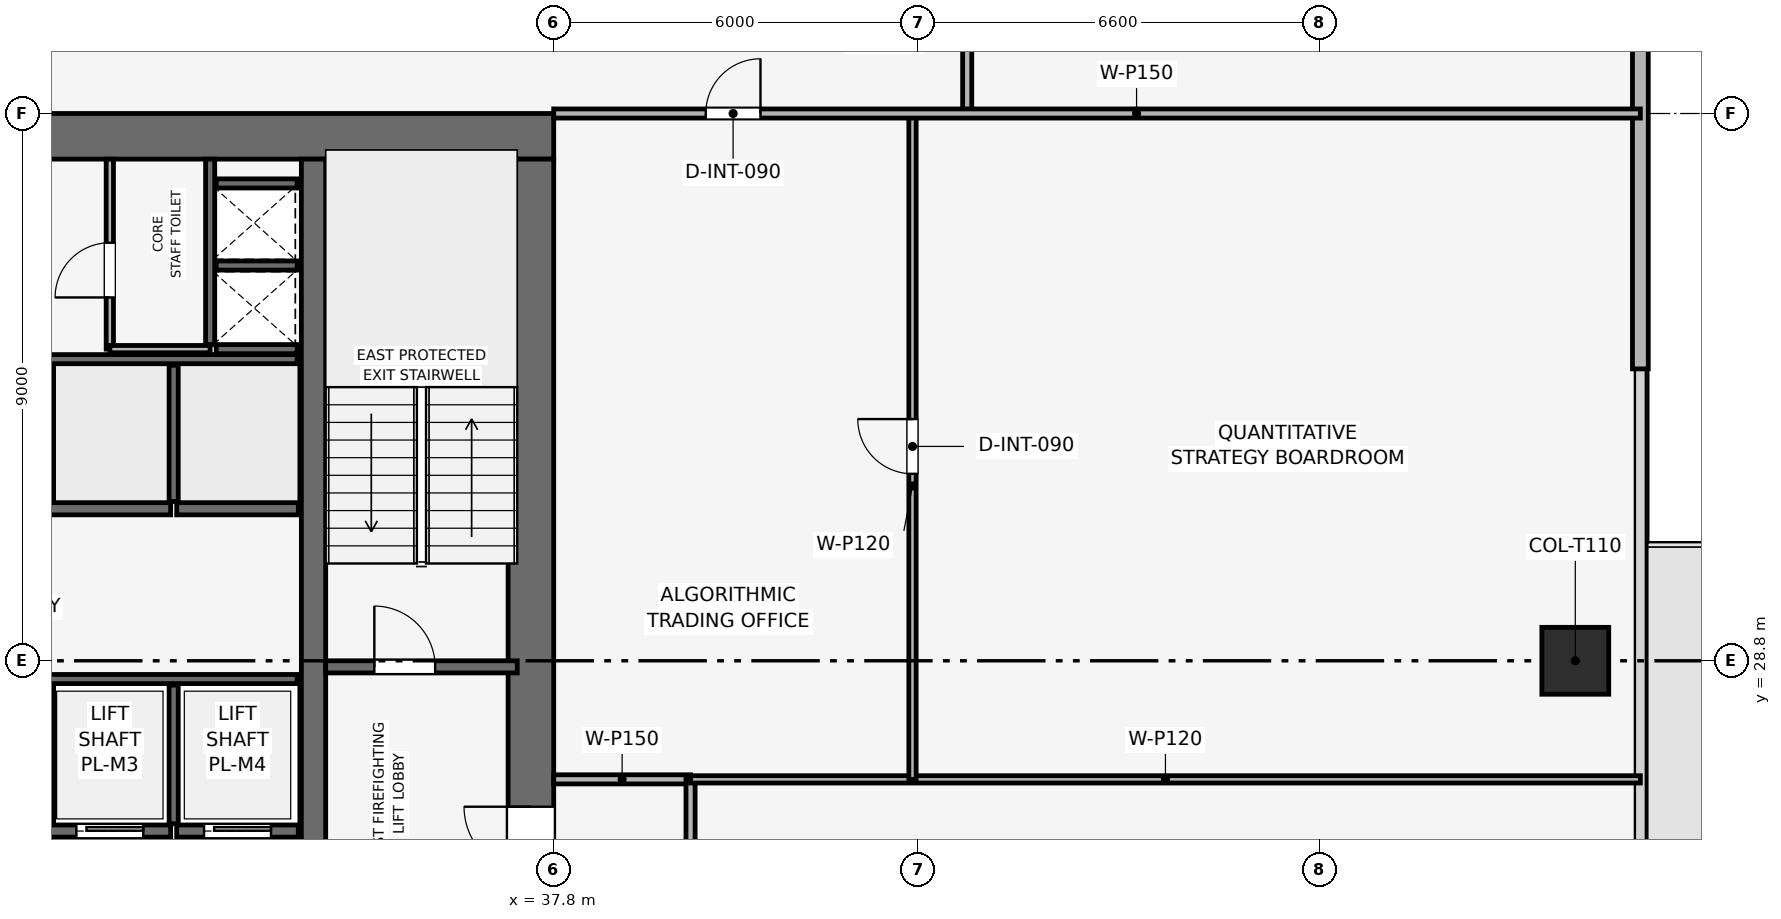
"""IFC4 building model, lengths in metres.
Left out: names, types, materials, properties, quantities, classifications, styles, units other than length and angle.
Written with IfcOpenShell. Run it as: python <this file> out.ifc"""

import sys

from ifc_helpers import new_model, si_unit, direction, frame, frame_2d, origin, origin_2d, place, context, subcontext, project, spatial, rectangle, extrude, element, fill, save


model = new_model("IFC4")
c1 = context("Model", 3, precision=1e-05, world=origin(), true_north=direction((0.0, 1.0)))
c2 = subcontext(c1, "Body", "Model", "MODEL_VIEW")
j1 = project(units=[si_unit("LENGTHUNIT", "METRE"), si_unit("PLANEANGLEUNIT", "RADIAN")], contexts=[c1])
p1 = place(None, origin())
s1 = spatial("IfcSite", under=j1, at=p1, CompositionType="ELEMENT")
p2 = place(p1, origin())
s2 = spatial("IfcBuilding", under=s1, at=p2, CompositionType="ELEMENT")
p3 = place(p2, frame((0.0, 0.0, 229.95)))
s3 = spatial("IfcBuildingStorey", under=s2, at=p3, CompositionType="ELEMENT", Elevation=229.95)
p4 = place(p3, frame((19.8, 37.425, 0.0), z_axis=(0.0, 0.0, 1.0), x_axis=(1.0, 0.0, 0.0)))
e1 = element("IfcWall", 1, at=p4, inside=s3, PredefinedType="SHEAR", context=c2, shape_type="SweptSolid", body=[
    extrude(rectangle(XDim=18.0, YDim=0.75, at=frame_2d((9.0, 0.0))), origin(), (0.0, 0.0, 1.0), 3.75),
])
p5 = place(p4, frame((7.05, 0.0, 0.0)))
e2 = element("IfcOpeningElement", 2, at=p5, cuts=e1, PredefinedType="OPENING", context=c2, shape_type="SweptSolid", body=[
    extrude(rectangle(XDim=1.1, YDim=2.15, at=frame_2d((0.55, 1.075))), frame((0.0, 0.385, 0.0), z_axis=(0.0, -1.0, 0.0), x_axis=(1.0, 0.0, 0.0)), (0.0, 0.0, 1.0), 0.77),
])
p6 = place(p3, frame((37.425, 20.55, 0.0), z_axis=(0.0, 0.0, 1.0), x_axis=(0.0, 1.0, 0.0)))
e3 = element("IfcWall", 3, at=p6, inside=s3, PredefinedType="SHEAR", context=c2, shape_type="SweptSolid", body=[
    extrude(rectangle(XDim=16.5, YDim=0.75, at=frame_2d((8.25, 0.0))), origin(), (0.0, 0.0, 1.0), 3.75),
])
p7 = place(p6, frame((4.75, 0.0, 0.0)))
e4 = element("IfcOpeningElement", 4, at=p7, cuts=e3, PredefinedType="OPENING", context=c2, shape_type="SweptSolid", body=[
    extrude(rectangle(XDim=1.1, YDim=2.15, at=frame_2d((0.55, 1.075))), frame((0.0, 0.385, 0.0), z_axis=(0.0, -1.0, 0.0), x_axis=(1.0, 0.0, 0.0)), (0.0, 0.0, 1.0), 0.77),
])
p8 = place(p3, frame((33.85, 20.55, 0.0), z_axis=(0.0, 0.0, 1.0), x_axis=(0.0, 1.0, 0.0)))
e5 = element("IfcWall", 5, at=p8, inside=s3, PredefinedType="SHEAR", context=c2, shape_type="SweptSolid", body=[
    extrude(rectangle(XDim=16.5, YDim=0.4, at=frame_2d((8.25, 0.0))), origin(), (0.0, 0.0, 1.0), 3.75),
])
p9 = place(p3, frame((54.6, 28.8, 0.003), z_axis=(0.0, 0.0, 1.0), x_axis=(1.0, 0.0, 0.0)))
e6 = element("IfcColumn", 6, at=p9, inside=s3, PredefinedType="COLUMN", context=c2, shape_type="SweptSolid", body=[
    extrude(rectangle(XDim=1.1, YDim=1.1, at=origin_2d()), origin(), (0.0, 0.0, 1.0), 3.494),
])
p10 = place(p3, frame((55.67, 48.3, 0.0), z_axis=(0.0, 0.0, 1.0), x_axis=(0.0, -1.0, 0.0)))
e7 = element("IfcWall", 7, at=p10, inside=s3, PredefinedType="SOLIDWALL", context=c2, shape_type="SweptSolid", body=[
    extrude(rectangle(XDim=14.7, YDim=0.26, at=frame_2d((7.35, 0.0))), origin(), (0.0, 0.0, 1.0), 3.5),
])
p11 = place(p10, frame((0.25, 0.0, 0.9)))
e8 = element("IfcOpeningElement", 8, at=p11, cuts=e7, PredefinedType="OPENING", context=c2, shape_type="SweptSolid", body=[
    extrude(rectangle(XDim=3.8, YDim=1.9, at=frame_2d((1.9, 0.95))), frame((0.0, 0.14, 0.0), z_axis=(0.0, -1.0, 0.0), x_axis=(1.0, 0.0, 0.0)), (0.0, 0.0, 1.0), 0.28),
])
p12 = place(p3, frame((34.05, 28.7, 0.0), z_axis=(0.0, 0.0, 1.0), x_axis=(1.0, 0.0, 0.0)))
e9 = element("IfcWall", 9, at=p12, inside=s3, PredefinedType="SHEAR", context=c2, shape_type="SweptSolid", body=[
    extrude(rectangle(XDim=3.15, YDim=0.2, at=frame_2d((1.575, 0.0))), origin(), (0.0, 0.0, 1.0), 3.5),
])
p13 = place(p12, frame((0.8, 0.0, 0.0)))
e10 = element("IfcOpeningElement", 10, at=p13, cuts=e9, PredefinedType="OPENING", context=c2, shape_type="SweptSolid", body=[
    extrude(rectangle(XDim=1.0, YDim=2.1, at=frame_2d((0.5, 1.05))), frame((0.0, 0.11, 0.0), z_axis=(0.0, -1.0, 0.0), x_axis=(1.0, 0.0, 0.0)), (0.0, 0.0, 1.0), 0.22),
])
p14 = place(p3, frame((32.15, 34.0, 0.0), z_axis=(0.0, 0.0, 1.0), x_axis=(0.0, 1.0, 0.0)))
e11 = element("IfcWall", 11, at=p14, inside=s3, PredefinedType="SHEAR", context=c2, shape_type="SweptSolid", body=[
    extrude(rectangle(XDim=3.05, YDim=0.15, at=frame_2d((1.525, 0.0))), origin(), (0.0, 0.0, 1.0), 3.5),
])
for number, where, z_axis, x_axis in (
    (12, (32.25, 33.925, 0.0), (0.0, 0.0, 1.0), (1.0, 0.0, 0.0)),
    (13, (32.25, 35.3, 0.0), (0.0, 0.0, 1.0), (1.0, 0.0, 0.0)),
):
    element("IfcWall", number, at=place(p3, frame(where, z_axis=z_axis, x_axis=x_axis)), inside=s3, PredefinedType="SHEAR", context=c2, shape_type="SweptSolid", body=[
        extrude(rectangle(XDim=1.33, YDim=0.15, at=frame_2d((0.665, 0.0))), origin(), (0.0, 0.0, 1.0), 3.5),
    ])
p15 = place(p3, frame((29.5, 26.0, 0.0), z_axis=(0.0, 0.0, 1.0), x_axis=(1.0, 0.0, 0.0)))
e14 = element("IfcWall", 14, at=p15, inside=s3, PredefinedType="SHEAR", context=c2, shape_type="SweptSolid", body=[
    extrude(rectangle(XDim=2.0, YDim=0.2, at=frame_2d((1.0, 0.0))), origin(), (0.0, 0.0, 1.0), 3.5),
])
p16 = place(p15, frame((0.45, 0.0, 0.0)))
e15 = element("IfcOpeningElement", 15, at=p16, cuts=e14, PredefinedType="OPENING", context=c2, shape_type="SweptSolid", body=[
    extrude(rectangle(XDim=1.1, YDim=2.15, at=frame_2d((0.55, 1.075))), frame((0.0, 0.11, 0.0), z_axis=(0.0, -1.0, 0.0), x_axis=(1.0, 0.0, 0.0)), (0.0, 0.0, 1.0), 0.22),
])
p17 = place(p3, frame((31.6, 26.0, 0.0), z_axis=(0.0, 0.0, 1.0), x_axis=(1.0, 0.0, 0.0)))
e16 = element("IfcWall", 16, at=p17, inside=s3, PredefinedType="SHEAR", context=c2, shape_type="SweptSolid", body=[
    extrude(rectangle(XDim=2.0, YDim=0.2, at=frame_2d((1.0, 0.0))), origin(), (0.0, 0.0, 1.0), 3.5),
])
p18 = place(p17, frame((0.45, 0.0, 0.0)))
e17 = element("IfcOpeningElement", 17, at=p18, cuts=e16, PredefinedType="OPENING", context=c2, shape_type="SweptSolid", body=[
    extrude(rectangle(XDim=1.1, YDim=2.15, at=frame_2d((0.55, 1.075))), frame((0.0, 0.11, 0.0), z_axis=(0.0, -1.0, 0.0), x_axis=(1.0, 0.0, 0.0)), (0.0, 0.0, 1.0), 0.22),
])
for number, where, z_axis, x_axis in (
    (18, (29.5, 31.3, 0.0), (0.0, 0.0, 1.0), (1.0, 0.0, 0.0)),
    (19, (31.6, 31.3, 0.0), (0.0, 0.0, 1.0), (1.0, 0.0, 0.0)),
):
    element("IfcWall", number, at=place(p3, frame(where, z_axis=z_axis, x_axis=x_axis)), inside=s3, PredefinedType="SHEAR", context=c2, shape_type="SweptSolid", body=[
        extrude(rectangle(XDim=2.0, YDim=0.2, at=frame_2d((1.0, 0.0))), origin(), (0.0, 0.0, 1.0), 3.5),
    ])
p19 = place(p3, frame((32.25, 36.65, 0.0), z_axis=(0.0, 0.0, 1.0), x_axis=(1.0, 0.0, 0.0)))
e20 = element("IfcWall", 20, at=p19, inside=s3, PredefinedType="SHEAR", context=c2, shape_type="SweptSolid", body=[
    extrude(rectangle(XDim=1.33, YDim=0.15, at=frame_2d((0.665, 0.0))), origin(), (0.0, 0.0, 1.0), 3.5),
])
p20 = place(p3, frame((29.5, 28.5, 0.0), z_axis=(0.0, 0.0, 1.0), x_axis=(1.0, 0.0, 0.0)))
e21 = element("IfcWall", 21, at=p20, inside=s3, PredefinedType="SHEAR", context=c2, shape_type="SweptSolid", body=[
    extrude(rectangle(XDim=4.08, YDim=0.15, at=frame_2d((2.04, 0.0))), origin(), (0.0, 0.0, 1.0), 3.5),
])
for number, where, z_axis, x_axis in (
    (22, (29.5, 26.12, 0.0), (0.0, 0.0, 1.0), (0.0, 1.0, 0.0)),
    (23, (31.55, 26.12, 0.0), (0.0, 0.0, 1.0), (0.0, 1.0, 0.0)),
):
    element("IfcWall", number, at=place(p3, frame(where, z_axis=z_axis, x_axis=x_axis)), inside=s3, PredefinedType="SHEAR", context=c2, shape_type="SweptSolid", body=[
        extrude(rectangle(XDim=2.28, YDim=0.15, at=frame_2d((1.14, 0.0))), origin(), (0.0, 0.0, 1.0), 3.5),
    ])
p21 = place(p3, frame((29.5, 33.76, 0.0), z_axis=(0.0, 0.0, 1.0), x_axis=(1.0, 0.0, 0.0)))
e24 = element("IfcWall", 24, at=p21, inside=s3, PredefinedType="SHEAR", context=c2, shape_type="SweptSolid", body=[
    extrude(rectangle(XDim=4.08, YDim=0.15, at=frame_2d((2.04, 0.0))), origin(), (0.0, 0.0, 1.0), 3.5),
])
for number, where, z_axis, x_axis in (
    (25, (29.5, 31.42, 0.0), (0.0, 0.0, 1.0), (0.0, 1.0, 0.0)),
    (26, (31.55, 31.42, 0.0), (0.0, 0.0, 1.0), (0.0, 1.0, 0.0)),
):
    element("IfcWall", number, at=place(p3, frame(where, z_axis=z_axis, x_axis=x_axis)), inside=s3, PredefinedType="SHEAR", context=c2, shape_type="SweptSolid", body=[
        extrude(rectangle(XDim=2.24, YDim=0.15, at=frame_2d((1.12, 0.0))), origin(), (0.0, 0.0, 1.0), 3.5),
    ])
p22 = place(p3, frame((30.5, 33.925, 0.0), z_axis=(0.0, 0.0, 1.0), x_axis=(0.0, 1.0, 0.0)))
e27 = element("IfcWall", 27, at=p22, inside=s3, PredefinedType="PARTITIONING", context=c2, shape_type="SweptSolid", body=[
    extrude(rectangle(XDim=3.125, YDim=0.12, at=frame_2d((1.562, 0.0))), origin(), (0.0, 0.0, 1.0), 3.5),
])
p23 = place(p22, frame((0.85, 0.0, 0.0)))
e28 = element("IfcOpeningElement", 28, at=p23, cuts=e27, PredefinedType="OPENING", context=c2, shape_type="SweptSolid", body=[
    extrude(rectangle(XDim=0.9, YDim=2.1, at=frame_2d((0.45, 1.05))), frame((0.0, 0.07, 0.0), z_axis=(0.0, -1.0, 0.0), x_axis=(1.0, 0.0, 0.0)), (0.0, 0.0, 1.0), 0.14),
])
p24 = place(p3, frame((30.5, 33.925, 0.0), z_axis=(0.0, 0.0, 1.0), x_axis=(1.0, 0.0, 0.0)))
e29 = element("IfcWall", 29, at=p24, inside=s3, PredefinedType="PARTITIONING", context=c2, shape_type="SweptSolid", body=[
    extrude(rectangle(XDim=1.65, YDim=0.12, at=frame_2d((0.825, 0.0))), origin(), (0.0, 0.0, 1.0), 3.5),
])
p25 = place(p3, frame((37.8, 26.85, 0.0), z_axis=(0.0, 0.0, 1.0), x_axis=(1.0, 0.0, 0.0)))
e30 = element("IfcWall", 30, at=p25, inside=s3, PredefinedType="PARTITIONING", context=c2, shape_type="SweptSolid", body=[
    extrude(rectangle(XDim=2.25, YDim=0.15, at=frame_2d((1.125, 0.0))), origin(), (0.0, 0.0, 1.0), 3.5),
])
p26 = place(p3, frame((40.05, 19.8, 0.0), z_axis=(0.0, 0.0, 1.0), x_axis=(0.0, 1.0, 0.0)))
e31 = element("IfcWall", 31, at=p26, inside=s3, PredefinedType="PARTITIONING", context=c2, shape_type="SweptSolid", body=[
    extrude(rectangle(XDim=7.05, YDim=0.15, at=frame_2d((3.525, 0.0))), origin(), (0.0, 0.0, 1.0), 3.035),
])
p27 = place(p3, frame((40.05, 26.85, 0.0), z_axis=(0.0, 0.0, 1.0), x_axis=(1.0, 0.0, 0.0)))
e32 = element("IfcWall", 32, at=p27, inside=s3, PredefinedType="PARTITIONING", context=c2, shape_type="SweptSolid", body=[
    extrude(rectangle(XDim=15.62, YDim=0.12, at=frame_2d((7.81, 0.0))), origin(), (0.0, 0.0, 1.0), 2.885),
])
p28 = place(p3, frame((43.7, 26.85, 0.0), z_axis=(0.0, 0.0, 1.0), x_axis=(0.0, 1.0, 0.0)))
e33 = element("IfcWall", 33, at=p28, inside=s3, PredefinedType="PARTITIONING", context=c2, shape_type="SweptSolid", body=[
    extrude(rectangle(XDim=10.95, YDim=0.12, at=frame_2d((5.475, 0.0))), origin(), (0.0, 0.0, 1.0), 3.035),
])
p29 = place(p28, frame((5.025, 0.0, 0.0)))
e34 = element("IfcOpeningElement", 34, at=p29, cuts=e33, PredefinedType="OPENING", context=c2, shape_type="SweptSolid", body=[
    extrude(rectangle(XDim=0.9, YDim=2.1, at=frame_2d((0.45, 1.05))), frame((0.0, 0.07, 0.0), z_axis=(0.0, -1.0, 0.0), x_axis=(1.0, 0.0, 0.0)), (0.0, 0.0, 1.0), 0.14),
])
p30 = place(p3, frame((44.6, 37.8, 0.0), z_axis=(0.0, 0.0, 1.0), x_axis=(0.0, 1.0, 0.0)))
e35 = element("IfcWall", 35, at=p30, inside=s3, PredefinedType="PARTITIONING", context=c2, shape_type="SweptSolid", body=[
    extrude(rectangle(XDim=2.4, YDim=0.15, at=frame_2d((1.2, 0.0))), origin(), (0.0, 0.0, 1.0), 3.5),
])
p31 = place(p3, frame((37.8, 37.8, 0.0), z_axis=(0.0, 0.0, 1.0), x_axis=(1.0, 0.0, 0.0)))
e36 = element("IfcWall", 36, at=p31, inside=s3, PredefinedType="PARTITIONING", context=c2, shape_type="SweptSolid", body=[
    extrude(rectangle(XDim=17.87, YDim=0.15, at=frame_2d((8.935, 0.0))), origin(), (0.0, 0.0, 1.0), 2.885),
])
p32 = place(p31, frame((2.5, 0.0, 0.0)))
e37 = element("IfcOpeningElement", 37, at=p32, cuts=e36, PredefinedType="OPENING", context=c2, shape_type="SweptSolid", body=[
    extrude(rectangle(XDim=0.9, YDim=2.1, at=frame_2d((0.45, 1.05))), frame((0.0, 0.085, 0.0), z_axis=(0.0, -1.0, 0.0), x_axis=(1.0, 0.0, 0.0)), (0.0, 0.0, 1.0), 0.17),
])
p33 = place(p13, origin())
e38 = element("IfcDoor", 38, at=p33, inside=s3, OperationType="SINGLE_SWING_LEFT", PredefinedType="DOOR", context=c2, shape_type="SweptSolid", body=[
    extrude(rectangle(XDim=1.0, YDim=2.1, at=frame_2d((0.5, 1.05))), frame((0.0, 0.025, 0.0), z_axis=(0.0, -1.0, 0.0), x_axis=(1.0, 0.0, 0.0)), (0.0, 0.0, 1.0), 0.05),
])
fill(e10, e38)
p34 = place(p16, origin())
e39 = element("IfcDoor", 39, at=p34, inside=s3, OperationType="SLIDING_TO_RIGHT", PredefinedType="DOOR", context=c2, shape_type="SweptSolid", body=[
    extrude(rectangle(XDim=1.1, YDim=2.15, at=frame_2d((0.55, 1.075))), frame((0.0, 0.025, 0.0), z_axis=(0.0, -1.0, 0.0), x_axis=(1.0, 0.0, 0.0)), (0.0, 0.0, 1.0), 0.05),
])
fill(e15, e39)
p35 = place(p18, origin())
e40 = element("IfcDoor", 40, at=p35, inside=s3, OperationType="SLIDING_TO_RIGHT", PredefinedType="DOOR", context=c2, shape_type="SweptSolid", body=[
    extrude(rectangle(XDim=1.1, YDim=2.15, at=frame_2d((0.55, 1.075))), frame((0.0, 0.025, 0.0), z_axis=(0.0, -1.0, 0.0), x_axis=(1.0, 0.0, 0.0)), (0.0, 0.0, 1.0), 0.05),
])
fill(e17, e40)
p36 = place(p23, origin())
e41 = element("IfcDoor", 41, at=p36, inside=s3, OperationType="SINGLE_SWING_LEFT", PredefinedType="DOOR", context=c2, shape_type="SweptSolid", body=[
    extrude(rectangle(XDim=0.9, YDim=2.1, at=frame_2d((0.45, 1.05))), frame((0.0, 0.025, 0.0), z_axis=(0.0, -1.0, 0.0), x_axis=(1.0, 0.0, 0.0)), (0.0, 0.0, 1.0), 0.05),
])
fill(e28, e41)
p37 = place(p29, origin())
e42 = element("IfcDoor", 42, at=p37, inside=s3, OperationType="SINGLE_SWING_RIGHT", PredefinedType="DOOR", context=c2, shape_type="SweptSolid", body=[
    extrude(rectangle(XDim=0.9, YDim=2.1, at=frame_2d((0.45, 1.05))), frame((0.0, 0.025, 0.0), z_axis=(0.0, -1.0, 0.0), x_axis=(1.0, 0.0, 0.0)), (0.0, 0.0, 1.0), 0.05),
])
fill(e34, e42)
p38 = place(p32, origin())
e43 = element("IfcDoor", 43, at=p38, inside=s3, OperationType="SINGLE_SWING_RIGHT", PredefinedType="DOOR", context=c2, shape_type="SweptSolid", body=[
    extrude(rectangle(XDim=0.9, YDim=2.1, at=frame_2d((0.45, 1.05))), frame((0.0, 0.025, 0.0), z_axis=(0.0, -1.0, 0.0), x_axis=(1.0, 0.0, 0.0)), (0.0, 0.0, 1.0), 0.05),
])
fill(e37, e43)
p39 = place(p7, origin())
e44 = element("IfcDoor", 44, at=p39, inside=s3, OperationType="SINGLE_SWING_RIGHT", PredefinedType="DOOR", context=c2, shape_type="SweptSolid", body=[
    extrude(rectangle(XDim=1.1, YDim=2.15, at=frame_2d((0.55, 1.075))), frame((0.0, 0.025, 0.0), z_axis=(0.0, -1.0, 0.0), x_axis=(1.0, 0.0, 0.0)), (0.0, 0.0, 1.0), 0.05),
])
fill(e4, e44)
save(model, sys.argv[1])
